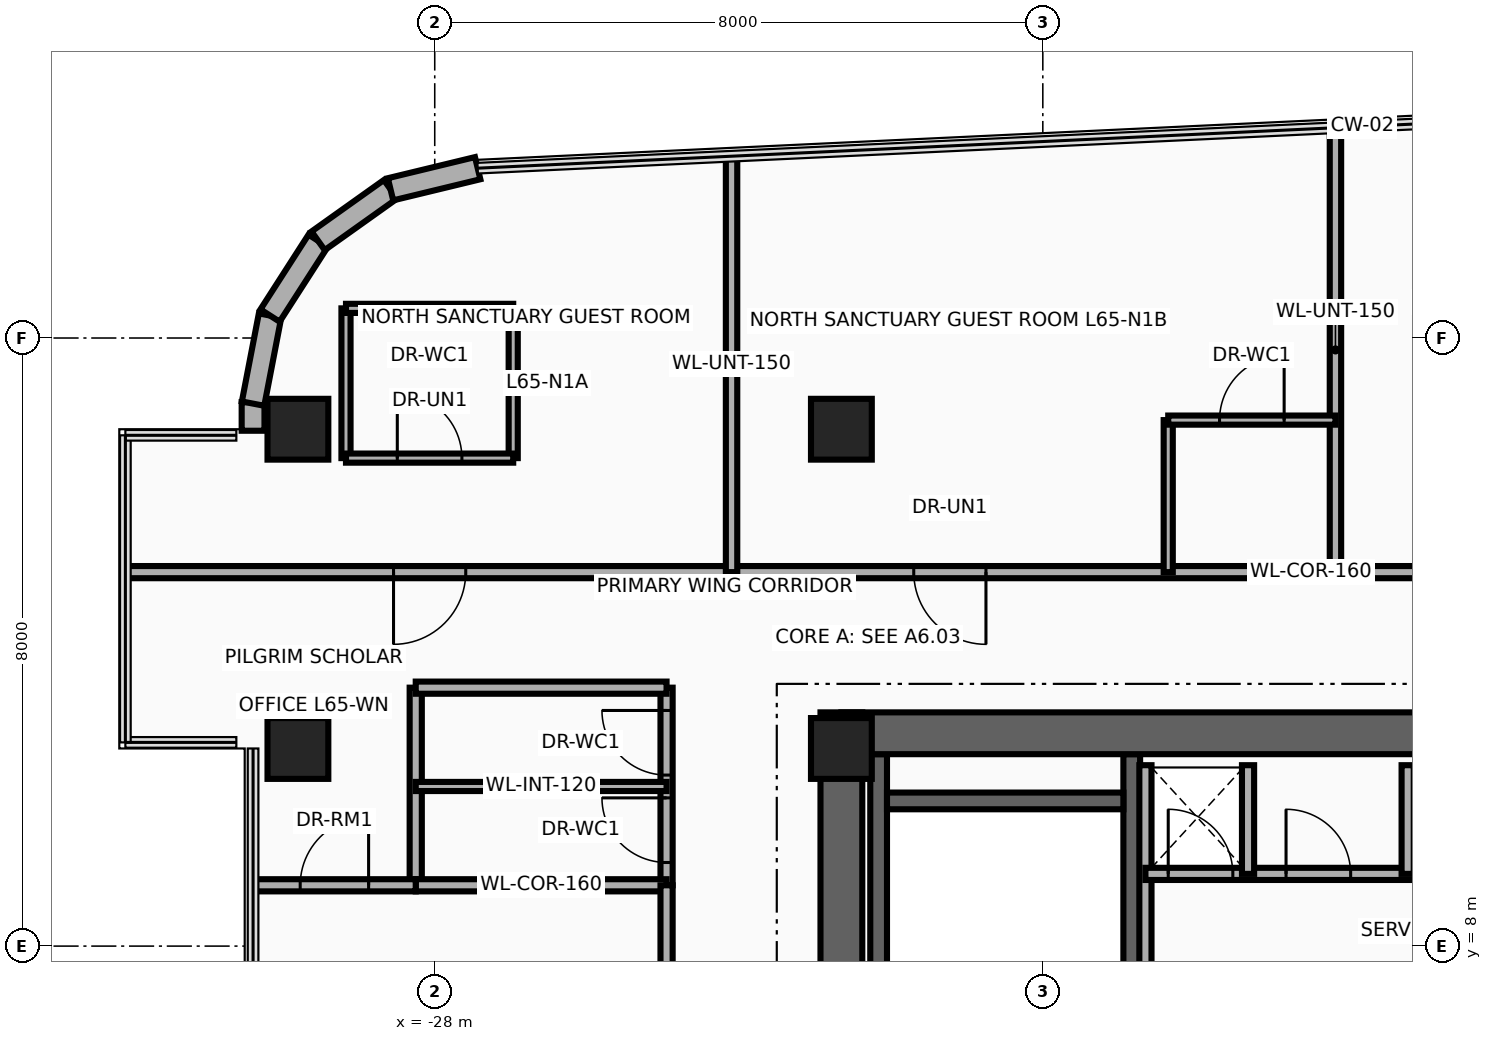
"""IFC4 building model, lengths in metres.
Left out: names, types, materials, properties, quantities, classifications, styles, units other than length and angle.
Written with IfcOpenShell. Run it as: python <this file> out.ifc"""

import sys

from ifc_helpers import new_model, si_unit, direction, frame, frame_2d, origin, origin_2d, place, context, subcontext, project, spatial, rectangle, extrude, source, transform, mapped, element, fill, save


model = new_model("IFC4")
c1 = context("Model", 3, precision=1e-05, world=origin(), true_north=direction((0.0, 1.0)))
c2 = subcontext(c1, "Body", "Model", "MODEL_VIEW")
j1 = project(units=[si_unit("LENGTHUNIT", "METRE"), si_unit("PLANEANGLEUNIT", "RADIAN")], contexts=[c1])
p1 = place(None, origin())
s1 = spatial("IfcSite", under=j1, at=p1, CompositionType="ELEMENT")
p2 = place(p1, origin())
s2 = spatial("IfcBuilding", under=s1, at=p2, CompositionType="ELEMENT")
p3 = place(p2, frame((0.0, 0.0, 251.0)))
s3 = spatial("IfcBuildingStorey", under=s2, at=p3, CompositionType="ELEMENT", Elevation=251.0)
for number, where, z_axis, x_axis in (
    (1, (-22.16, 1.78, 0.0), (0.0, 0.0, 1.0), (0.0, 1.0, 0.0)),
    (2, (-18.83, 1.78, 0.0), (0.0, 0.0, 1.0), (0.0, 1.0, 0.0)),
):
    element("IfcWall", number, at=place(p3, frame(where, z_axis=z_axis, x_axis=x_axis)), inside=s3, PredefinedType="SHEAR", context=c2, shape_type="SweptSolid", body=[
        extrude(rectangle(XDim=8.745, YDim=0.22, at=frame_2d((4.373, 0.0))), origin(), (0.0, 0.0, 1.0), 3.26),
    ])
p4 = place(p3, frame((-22.05, 9.91, 0.0), z_axis=(0.0, 0.0, 1.0), x_axis=(1.0, 0.0, 0.0)))
e3 = element("IfcWall", 3, at=p4, inside=s3, PredefinedType="SHEAR", context=c2, shape_type="SweptSolid", body=[
    extrude(rectangle(XDim=3.11, YDim=0.22, at=frame_2d((1.555, 0.0))), origin(), (0.0, 0.0, 1.0), 3.26),
])
p5 = place(p3, frame((-22.65, -11.075, 0.0), z_axis=(0.0, 0.0, 1.0), x_axis=(0.0, 1.0, 0.0)))
e4 = element("IfcWall", 4, at=p5, inside=s3, PredefinedType="SHEAR", context=c2, shape_type="SweptSolid", body=[
    extrude(rectangle(XDim=22.15, YDim=0.55, at=frame_2d((11.075, 0.0))), origin(), (0.0, 0.0, 1.0), 3.26),
])
p6 = place(p3, frame((-22.65, 10.8, 0.0), z_axis=(0.0, 0.0, 1.0), x_axis=(1.0, 0.0, 0.0)))
e5 = element("IfcWall", 5, at=p6, inside=s3, PredefinedType="SHEAR", context=c2, shape_type="SweptSolid", body=[
    extrude(rectangle(XDim=10.25, YDim=0.55, at=frame_2d((5.125, 0.0))), origin(), (0.0, 0.0, 1.0), 3.26),
])
m1 = source(origin(), c2, "Body", "SweptSolid", [
    extrude(rectangle(XDim=0.8, YDim=0.8, at=origin_2d()), origin(), (0.0, 0.0, 1.0), 3.5),
])
for number, where, z_axis, x_axis in (
    (6, (-29.8, 10.6, 0.0), (0.0, 0.0, 1.0), (1.0, 0.0, 0.0)),
    (7, (-22.65, 10.6, 0.0), (0.0, 0.0, 1.0), (1.0, 0.0, 0.0)),
    (8, (-29.8, 14.8, 0.0), (0.0, 0.0, 1.0), (1.0, 0.0, 0.0)),
    (9, (-22.65, 14.8, 0.0), (0.0, 0.0, 1.0), (1.0, 0.0, 0.0)),
):
    element("IfcColumn", number, at=place(p3, frame(where, z_axis=z_axis, x_axis=x_axis)), inside=s3, PredefinedType="COLUMN", context=c2, shape_type="MappedRepresentation", body=[
        mapped(m1, transform((0.0, 0.0, 0.0), x_axis=(1.0, 0.0, 0.0), y_axis=(0.0, 1.0, 0.0), z_axis=(0.0, 0.0, 1.0), scale=1.0)),
    ])
p7 = place(p3, frame((-30.39, 14.78, 0.0), z_axis=(0.0, 0.0, 1.0), x_axis=(0.0, 1.0, 0.0)))
e10 = element("IfcWall", 10, at=p7, inside=s3, PredefinedType="SOLIDWALL", context=c2, shape_type="SweptSolid", body=[
    extrude(rectangle(XDim=0.377, YDim=0.3, at=frame_2d((0.188, 0.0))), origin(), (0.0, 0.0, 1.0), 2.245),
])
p8 = place(p3, frame((-30.39, 15.137, 0.0), z_axis=(0.0, 0.0, 1.0), x_axis=(0.189307792679, 0.981917796779, 0.0)))
e11 = element("IfcWall", 11, at=p8, inside=s3, PredefinedType="SOLIDWALL", context=c2, shape_type="SweptSolid", body=[
    extrude(rectangle(XDim=1.18, YDim=0.3, at=frame_2d((0.59, 0.0))), origin(), (0.0, 0.0, 1.0), 2.245),
])
p9 = place(p3, frame((-30.167, 16.295, 0.0), z_axis=(0.0, 0.0, 1.0), x_axis=(0.540842020947, 0.841124193195, 0.0)))
e12 = element("IfcWall", 12, at=p9, inside=s3, PredefinedType="SOLIDWALL", context=c2, shape_type="SweptSolid", body=[
    extrude(rectangle(XDim=1.169, YDim=0.3, at=frame_2d((0.584, 0.0))), origin(), (0.0, 0.0, 1.0), 3.26),
])
p10 = place(p3, frame((-29.534, 17.279, 0.0), z_axis=(0.0, 0.0, 1.0), x_axis=(0.81466371606, 0.579933642527, 0.0)))
e13 = element("IfcWall", 13, at=p10, inside=s3, PredefinedType="SOLIDWALL", context=c2, shape_type="SweptSolid", body=[
    extrude(rectangle(XDim=1.169, YDim=0.3, at=frame_2d((0.584, 0.0))), origin(), (0.0, 0.0, 1.0), 3.26),
])
p11 = place(p3, frame((-28.582, 17.957, 0.0), z_axis=(0.0, 0.0, 1.0), x_axis=(0.971929016595, 0.235274279725, 0.0)))
e14 = element("IfcWall", 14, at=p11, inside=s3, PredefinedType="SOLIDWALL", context=c2, shape_type="SweptSolid", body=[
    extrude(rectangle(XDim=1.18, YDim=0.3, at=frame_2d((0.59, 0.0))), origin(), (0.0, 0.0, 1.0), 3.26),
])
p12 = place(p3, frame((-18.65, 7.45, 0.0), z_axis=(0.0, 0.0, 1.0), x_axis=(0.0, 1.0, 0.0)))
e15 = element("IfcWall", 15, at=p12, inside=s3, PredefinedType="PARTITIONING", context=c2, shape_type="SweptSolid", body=[
    extrude(rectangle(XDim=2.93, YDim=0.16, at=frame_2d((1.465, 0.0))), origin(), (0.0, 0.0, 1.0), 3.26),
])
p13 = place(p3, frame((-18.65, 8.95, 0.0), z_axis=(0.0, 0.0, 1.0), x_axis=(1.0, 0.0, 0.0)))
e16 = element("IfcWall", 16, at=p13, inside=s3, PredefinedType="PARTITIONING", context=c2, shape_type="SweptSolid", body=[
    extrude(rectangle(XDim=5.5, YDim=0.16, at=frame_2d((2.75, 0.0))), origin(), (0.0, 0.0, 1.0), 3.26),
])
p14 = place(p13, frame((0.3, 0.0, 0.0)))
e17 = element("IfcOpeningElement", 17, at=p14, cuts=e16, PredefinedType="OPENING", context=c2, shape_type="SweptSolid", body=[
    extrude(rectangle(XDim=0.85, YDim=2.05, at=frame_2d((0.425, 1.025))), frame((0.0, 0.095, 0.0), z_axis=(0.0, -1.0, 0.0), x_axis=(1.0, 0.0, 0.0)), (0.0, 0.0, 1.0), 0.19),
])
p15 = place(p13, frame((1.85, 0.0, 0.0)))
e18 = element("IfcOpeningElement", 18, at=p15, cuts=e16, PredefinedType="OPENING", context=c2, shape_type="SweptSolid", body=[
    extrude(rectangle(XDim=0.85, YDim=2.05, at=frame_2d((0.425, 1.025))), frame((0.0, 0.095, 0.0), z_axis=(0.0, -1.0, 0.0), x_axis=(1.0, 0.0, 0.0)), (0.0, 0.0, 1.0), 0.19),
])
p16 = place(p13, frame((3.9, 0.0, 0.0)))
e19 = element("IfcOpeningElement", 19, at=p16, cuts=e16, PredefinedType="OPENING", context=c2, shape_type="SweptSolid", body=[
    extrude(rectangle(XDim=0.85, YDim=2.05, at=frame_2d((0.425, 1.025))), frame((0.0, 0.095, 0.0), z_axis=(0.0, -1.0, 0.0), x_axis=(1.0, 0.0, 0.0)), (0.0, 0.0, 1.0), 0.19),
])
for number, where, z_axis, x_axis in (
    (20, (-17.3, 8.95, 0.0), (0.0, 0.0, 1.0), (0.0, 1.0, 0.0)),
    (21, (-15.2, 8.95, 0.0), (0.0, 0.0, 1.0), (0.0, 1.0, 0.0)),
):
    element("IfcWall", number, at=place(p3, frame(where, z_axis=z_axis, x_axis=x_axis)), inside=s3, PredefinedType="PARTITIONING", context=c2, shape_type="SweptSolid", body=[
        extrude(rectangle(XDim=1.43, YDim=0.16, at=frame_2d((0.715, 0.0))), origin(), (0.0, 0.0, 1.0), 3.26),
    ])
p17 = place(p3, frame((-28.25, 8.8, 0.0), z_axis=(0.0, 0.0, 1.0), x_axis=(0.0, 1.0, 0.0)))
e22 = element("IfcWall", 22, at=p17, inside=s3, PredefinedType="PARTITIONING", context=c2, shape_type="SweptSolid", body=[
    extrude(rectangle(XDim=2.6, YDim=0.16, at=frame_2d((1.3, 0.0))), origin(), (0.0, 0.0, 1.0), 2.544),
])
p18 = place(p3, frame((-24.95, 8.8, 0.0), z_axis=(0.0, 0.0, 1.0), x_axis=(0.0, 1.0, 0.0)))
e23 = element("IfcWall", 23, at=p18, inside=s3, PredefinedType="PARTITIONING", context=c2, shape_type="SweptSolid", body=[
    extrude(rectangle(XDim=2.6, YDim=0.16, at=frame_2d((1.3, 0.0))), origin(), (0.0, 0.0, 1.0), 2.544),
])
p19 = place(p18, frame((0.3, 0.0, 0.0)))
e24 = element("IfcOpeningElement", 24, at=p19, cuts=e23, PredefinedType="OPENING", context=c2, shape_type="SweptSolid", body=[
    extrude(rectangle(XDim=0.85, YDim=2.1, at=frame_2d((0.425, 1.05))), frame((0.0, 0.095, 0.0), z_axis=(0.0, -1.0, 0.0), x_axis=(1.0, 0.0, 0.0)), (0.0, 0.0, 1.0), 0.19),
])
p20 = place(p18, frame((1.45, 0.0, 0.0)))
e25 = element("IfcOpeningElement", 25, at=p20, cuts=e23, PredefinedType="OPENING", context=c2, shape_type="SweptSolid", body=[
    extrude(rectangle(XDim=0.85, YDim=2.1, at=frame_2d((0.425, 1.05))), frame((0.0, 0.095, 0.0), z_axis=(0.0, -1.0, 0.0), x_axis=(1.0, 0.0, 0.0)), (0.0, 0.0, 1.0), 0.19),
])
for number, where, z_axis, x_axis in (
    (26, (-28.25, 8.8, 0.0), (0.0, 0.0, 1.0), (1.0, 0.0, 0.0)),
    (27, (-28.25, 11.4, 0.0), (0.0, 0.0, 1.0), (1.0, 0.0, 0.0)),
):
    element("IfcWall", number, at=place(p3, frame(where, z_axis=z_axis, x_axis=x_axis)), inside=s3, PredefinedType="PARTITIONING", context=c2, shape_type="SweptSolid", body=[
        extrude(rectangle(XDim=3.3, YDim=0.16, at=frame_2d((1.65, 0.0))), origin(), (0.0, 0.0, 1.0), 3.26),
    ])
p21 = place(p3, frame((-28.25, 10.1, 0.0), z_axis=(0.0, 0.0, 1.0), x_axis=(1.0, 0.0, 0.0)))
e28 = element("IfcWall", 28, at=p21, inside=s3, PredefinedType="PARTITIONING", context=c2, shape_type="SweptSolid", body=[
    extrude(rectangle(XDim=3.3, YDim=0.12, at=frame_2d((1.65, 0.0))), origin(), (0.0, 0.0, 1.0), 3.26),
])
p22 = place(p3, frame((-24.95, -16.24, 0.0), z_axis=(0.0, 0.0, 1.0), x_axis=(0.0, 1.0, 0.0)))
e29 = element("IfcWall", 29, at=p22, inside=s3, PredefinedType="PARTITIONING", context=c2, shape_type="SweptSolid", body=[
    extrude(rectangle(XDim=25.04, YDim=0.16, at=frame_2d((12.52, 0.0))), origin(), (0.0, 0.0, 1.0), 2.544),
])
p23 = place(p22, frame((3.273, 0.0, 0.0)))
e30 = element("IfcOpeningElement", 30, at=p23, cuts=e29, PredefinedType="OPENING", context=c2, shape_type="SweptSolid", body=[
    extrude(rectangle(XDim=1.8, YDim=2.15, at=frame_2d((0.9, 1.075))), frame((0.0, 0.095, 0.0), z_axis=(0.0, -1.0, 0.0), x_axis=(1.0, 0.0, 0.0)), (0.0, 0.0, 1.0), 0.19),
])
p24 = place(p22, frame((11.62, 0.0, 0.0)))
e31 = element("IfcOpeningElement", 31, at=p24, cuts=e29, PredefinedType="OPENING", context=c2, shape_type="SweptSolid", body=[
    extrude(rectangle(XDim=1.8, YDim=2.15, at=frame_2d((0.9, 1.075))), frame((0.0, 0.095, 0.0), z_axis=(0.0, -1.0, 0.0), x_axis=(1.0, 0.0, 0.0)), (0.0, 0.0, 1.0), 0.19),
])
p25 = place(p22, frame((19.967, 0.0, 0.0)))
e32 = element("IfcOpeningElement", 32, at=p25, cuts=e29, PredefinedType="OPENING", context=c2, shape_type="SweptSolid", body=[
    extrude(rectangle(XDim=1.8, YDim=2.15, at=frame_2d((0.9, 1.075))), frame((0.0, 0.095, 0.0), z_axis=(0.0, -1.0, 0.0), x_axis=(1.0, 0.0, 0.0)), (0.0, 0.0, 1.0), 0.19),
])
p26 = place(p3, frame((-30.39, 8.8, 0.0), z_axis=(0.0, 0.0, 1.0), x_axis=(1.0, 0.0, 0.0)))
e33 = element("IfcWall", 33, at=p26, inside=s3, PredefinedType="PARTITIONING", context=c2, shape_type="SweptSolid", body=[
    extrude(rectangle(XDim=2.14, YDim=0.16, at=frame_2d((1.07, 0.0))), origin(), (0.0, 0.0, 1.0), 2.706),
])
p27 = place(p26, frame((0.62, 0.0, 0.0)))
e34 = element("IfcOpeningElement", 34, at=p27, cuts=e33, PredefinedType="OPENING", context=c2, shape_type="SweptSolid", body=[
    extrude(rectangle(XDim=0.9, YDim=2.1, at=frame_2d((0.45, 1.05))), frame((0.0, 0.095, 0.0), z_axis=(0.0, -1.0, 0.0), x_axis=(1.0, 0.0, 0.0)), (0.0, 0.0, 1.0), 0.19),
])
p28 = place(p3, frame((-32.04, 12.92, 0.0), z_axis=(0.0, 0.0, 1.0), x_axis=(1.0, 0.0, 0.0)))
e35 = element("IfcWall", 35, at=p28, inside=s3, PredefinedType="PARTITIONING", context=c2, shape_type="SweptSolid", body=[
    extrude(rectangle(XDim=31.13, YDim=0.16, at=frame_2d((15.565, 0.0))), origin(), (0.0, 0.0, 1.0), 2.634),
])
p29 = place(p28, frame((3.498, 0.0, 0.0)))
e36 = element("IfcOpeningElement", 36, at=p29, cuts=e35, PredefinedType="OPENING", context=c2, shape_type="SweptSolid", body=[
    extrude(rectangle(XDim=0.95, YDim=2.15, at=frame_2d((0.475, 1.075))), frame((0.0, 0.095, 0.0), z_axis=(0.0, -1.0, 0.0), x_axis=(1.0, 0.0, 0.0)), (0.0, 0.0, 1.0), 0.19),
])
p30 = place(p28, frame((10.342, 0.0, 0.0)))
e37 = element("IfcOpeningElement", 37, at=p30, cuts=e35, PredefinedType="OPENING", context=c2, shape_type="SweptSolid", body=[
    extrude(rectangle(XDim=0.95, YDim=2.15, at=frame_2d((0.475, 1.075))), frame((0.0, 0.095, 0.0), z_axis=(0.0, -1.0, 0.0), x_axis=(1.0, 0.0, 0.0)), (0.0, 0.0, 1.0), 0.19),
])
p31 = place(p28, frame((18.92, 0.0, 0.0)))
e38 = element("IfcOpeningElement", 38, at=p31, cuts=e35, PredefinedType="OPENING", context=c2, shape_type="SweptSolid", body=[
    extrude(rectangle(XDim=0.95, YDim=2.15, at=frame_2d((0.475, 1.075))), frame((0.0, 0.095, 0.0), z_axis=(0.0, -1.0, 0.0), x_axis=(1.0, 0.0, 0.0)), (0.0, 0.0, 1.0), 0.19),
])
p32 = place(p3, frame((-16.15, 12.92, 0.0), z_axis=(0.0, 0.0, 1.0), x_axis=(0.0, 1.0, 0.0)))
e39 = element("IfcWall", 39, at=p32, inside=s3, PredefinedType="PARTITIONING", context=c2, shape_type="SweptSolid", body=[
    extrude(rectangle(XDim=5.846, YDim=0.15, at=frame_2d((2.923, 0.0))), origin(), (0.0, 0.0, 1.0), 2.544),
])
p33 = place(p3, frame((-24.095, 12.92, 0.0), z_axis=(0.0, 0.0, 1.0), x_axis=(0.0, 1.0, 0.0)))
e40 = element("IfcWall", 40, at=p33, inside=s3, PredefinedType="PARTITIONING", context=c2, shape_type="SweptSolid", body=[
    extrude(rectangle(XDim=5.472, YDim=0.15, at=frame_2d((2.736, 0.0))), origin(), (0.0, 0.0, 1.0), 2.544),
])
for number, where, z_axis, x_axis in (
    (41, (-29.167, 14.42, 0.0), (0.0, 0.0, 1.0), (0.0, 1.0, 0.0)),
    (42, (-26.968, 14.42, 0.0), (0.0, 0.0, 1.0), (0.0, 1.0, 0.0)),
):
    element("IfcWall", number, at=place(p3, frame(where, z_axis=z_axis, x_axis=x_axis)), inside=s3, PredefinedType="PARTITIONING", context=c2, shape_type="SweptSolid", body=[
        extrude(rectangle(XDim=1.97, YDim=0.12, at=frame_2d((0.985, 0.0))), origin(), (0.0, 0.0, 1.0), 2.544),
    ])
p34 = place(p3, frame((-29.167, 16.39, 0.0), z_axis=(0.0, 0.0, 1.0), x_axis=(1.0, 0.0, 0.0)))
e43 = element("IfcWall", 43, at=p34, inside=s3, PredefinedType="PARTITIONING", context=c2, shape_type="SweptSolid", body=[
    extrude(rectangle(XDim=2.2, YDim=0.12, at=frame_2d((1.1, 0.0))), origin(), (0.0, 0.0, 1.0), 3.26),
])
p35 = place(p3, frame((-29.167, 14.42, 0.0), z_axis=(0.0, 0.0, 1.0), x_axis=(1.0, 0.0, 0.0)))
e44 = element("IfcWall", 44, at=p35, inside=s3, PredefinedType="PARTITIONING", context=c2, shape_type="SweptSolid", body=[
    extrude(rectangle(XDim=2.2, YDim=0.12, at=frame_2d((1.1, 0.0))), origin(), (0.0, 0.0, 1.0), 3.26),
])
p36 = place(p35, frame((0.675, 0.0, 0.0)))
e45 = element("IfcOpeningElement", 45, at=p36, cuts=e44, PredefinedType="OPENING", context=c2, shape_type="SweptSolid", body=[
    extrude(rectangle(XDim=0.85, YDim=2.1, at=frame_2d((0.425, 1.05))), frame((0.0, 0.075, 0.0), z_axis=(0.0, -1.0, 0.0), x_axis=(1.0, 0.0, 0.0)), (0.0, 0.0, 1.0), 0.15),
])
p37 = place(p3, frame((-18.35, 12.92, 0.0), z_axis=(0.0, 0.0, 1.0), x_axis=(0.0, 1.0, 0.0)))
e46 = element("IfcWall", 46, at=p37, inside=s3, PredefinedType="PARTITIONING", context=c2, shape_type="SweptSolid", body=[
    extrude(rectangle(XDim=2.0, YDim=0.12, at=frame_2d((1.0, 0.0))), origin(), (0.0, 0.0, 1.0), 2.544),
])
p38 = place(p3, frame((-18.35, 14.92, 0.0), z_axis=(0.0, 0.0, 1.0), x_axis=(1.0, 0.0, 0.0)))
e47 = element("IfcWall", 47, at=p38, inside=s3, PredefinedType="PARTITIONING", context=c2, shape_type="SweptSolid", body=[
    extrude(rectangle(XDim=2.2, YDim=0.12, at=frame_2d((1.1, 0.0))), origin(), (0.0, 0.0, 1.0), 2.544),
])
p39 = place(p38, frame((0.675, 0.0, 0.0)))
e48 = element("IfcOpeningElement", 48, at=p39, cuts=e47, PredefinedType="OPENING", context=c2, shape_type="SweptSolid", body=[
    extrude(rectangle(XDim=0.85, YDim=2.1, at=frame_2d((0.425, 1.05))), frame((0.0, 0.075, 0.0), z_axis=(0.0, -1.0, 0.0), x_axis=(1.0, 0.0, 0.0)), (0.0, 0.0, 1.0), 0.15),
])
p40 = place(p14, origin())
e49 = element("IfcDoor", 49, at=p40, inside=s3, OperationType="SINGLE_SWING_LEFT", PredefinedType="DOOR", context=c2, shape_type="SweptSolid", body=[
    extrude(rectangle(XDim=0.85, YDim=2.05, at=frame_2d((0.425, 1.025))), frame((0.0, 0.025, 0.0), z_axis=(0.0, -1.0, 0.0), x_axis=(1.0, 0.0, 0.0)), (0.0, 0.0, 1.0), 0.05),
])
fill(e17, e49)
p41 = place(p15, origin())
e50 = element("IfcDoor", 50, at=p41, inside=s3, OperationType="SINGLE_SWING_RIGHT", PredefinedType="DOOR", context=c2, shape_type="SweptSolid", body=[
    extrude(rectangle(XDim=0.85, YDim=2.05, at=frame_2d((0.425, 1.025))), frame((0.0, 0.025, 0.0), z_axis=(0.0, -1.0, 0.0), x_axis=(1.0, 0.0, 0.0)), (0.0, 0.0, 1.0), 0.05),
])
fill(e18, e50)
p42 = place(p19, origin())
e51 = element("IfcDoor", 51, at=p42, inside=s3, OperationType="SINGLE_SWING_RIGHT", PredefinedType="DOOR", context=c2, shape_type="SweptSolid", body=[
    extrude(rectangle(XDim=0.85, YDim=2.1, at=frame_2d((0.425, 1.05))), frame((0.0, 0.025, 0.0), z_axis=(0.0, -1.0, 0.0), x_axis=(1.0, 0.0, 0.0)), (0.0, 0.0, 1.0), 0.05),
])
fill(e24, e51)
p43 = place(p20, origin())
e52 = element("IfcDoor", 52, at=p43, inside=s3, OperationType="SINGLE_SWING_LEFT", PredefinedType="DOOR", context=c2, shape_type="SweptSolid", body=[
    extrude(rectangle(XDim=0.85, YDim=2.1, at=frame_2d((0.425, 1.05))), frame((0.0, 0.025, 0.0), z_axis=(0.0, -1.0, 0.0), x_axis=(1.0, 0.0, 0.0)), (0.0, 0.0, 1.0), 0.05),
])
fill(e25, e52)
p44 = place(p27, origin())
e53 = element("IfcDoor", 53, at=p44, inside=s3, OperationType="SINGLE_SWING_RIGHT", PredefinedType="DOOR", context=c2, shape_type="SweptSolid", body=[
    extrude(rectangle(XDim=0.9, YDim=2.1, at=frame_2d((0.45, 1.05))), frame((0.0, 0.025, 0.0), z_axis=(0.0, -1.0, 0.0), x_axis=(1.0, 0.0, 0.0)), (0.0, 0.0, 1.0), 0.05),
])
fill(e34, e53)
p45 = place(p29, frame((0.95, 0.0, 0.0), z_axis=(0.0, 0.0, 1.0), x_axis=(-1.0, 0.0, 0.0)))
e54 = element("IfcDoor", 54, at=p45, inside=s3, OperationType="SINGLE_SWING_LEFT", PredefinedType="DOOR", context=c2, shape_type="SweptSolid", body=[
    extrude(rectangle(XDim=0.95, YDim=2.15, at=frame_2d((0.475, 1.075))), frame((0.0, 0.025, 0.0), z_axis=(0.0, -1.0, 0.0), x_axis=(1.0, 0.0, 0.0)), (0.0, 0.0, 1.0), 0.05),
])
fill(e36, e54)
p46 = place(p36, origin())
e55 = element("IfcDoor", 55, at=p46, inside=s3, OperationType="SINGLE_SWING_RIGHT", PredefinedType="DOOR", context=c2, shape_type="SweptSolid", body=[
    extrude(rectangle(XDim=0.85, YDim=2.1, at=frame_2d((0.425, 1.05))), frame((0.0, 0.025, 0.0), z_axis=(0.0, -1.0, 0.0), x_axis=(1.0, 0.0, 0.0)), (0.0, 0.0, 1.0), 0.05),
])
fill(e45, e55)
p47 = place(p30, frame((0.95, 0.0, 0.0), z_axis=(0.0, 0.0, 1.0), x_axis=(-1.0, 0.0, 0.0)))
e56 = element("IfcDoor", 56, at=p47, inside=s3, OperationType="SINGLE_SWING_LEFT", PredefinedType="DOOR", context=c2, shape_type="SweptSolid", body=[
    extrude(rectangle(XDim=0.95, YDim=2.15, at=frame_2d((0.475, 1.075))), frame((0.0, 0.025, 0.0), z_axis=(0.0, -1.0, 0.0), x_axis=(1.0, 0.0, 0.0)), (0.0, 0.0, 1.0), 0.05),
])
fill(e37, e56)
p48 = place(p39, origin())
e57 = element("IfcDoor", 57, at=p48, inside=s3, OperationType="SINGLE_SWING_RIGHT", PredefinedType="DOOR", context=c2, shape_type="SweptSolid", body=[
    extrude(rectangle(XDim=0.85, YDim=2.1, at=frame_2d((0.425, 1.05))), frame((0.0, 0.025, 0.0), z_axis=(0.0, -1.0, 0.0), x_axis=(1.0, 0.0, 0.0)), (0.0, 0.0, 1.0), 0.05),
])
fill(e48, e57)
save(model, sys.argv[1])
